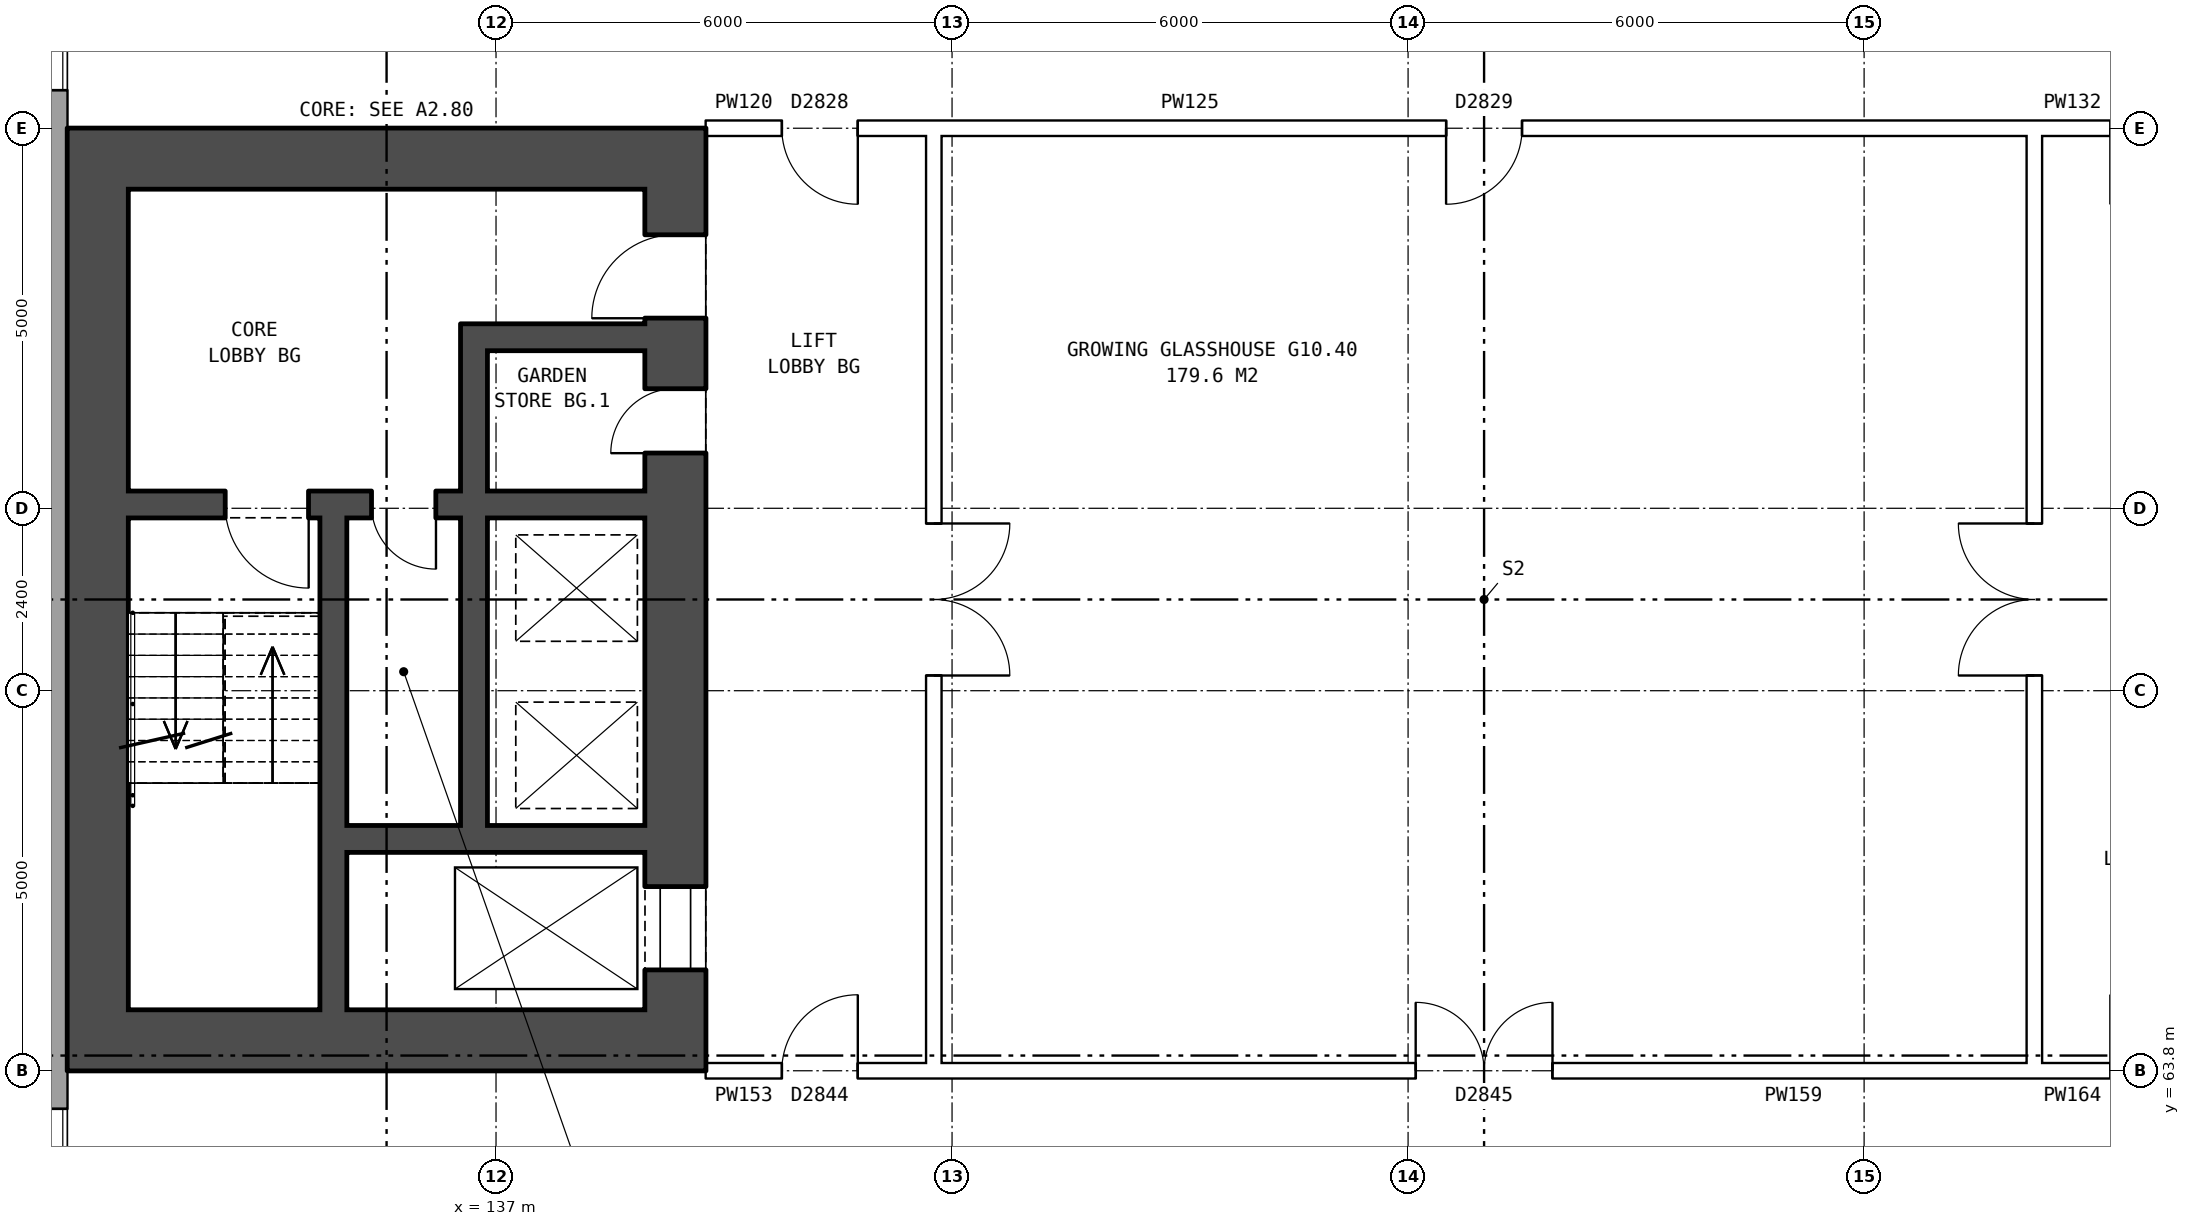
"""IFC4 building model, lengths in metres.
Left out: names, types, materials, properties, quantities, classifications, styles, units other than length and angle.
Written with IfcOpenShell. Run it as: python <this file> out.ifc"""

import sys

from ifc_helpers import new_model, si_unit, direction, frame, frame_2d, origin, place, context, subcontext, project, spatial, rectangle, extrude, element, fill, save


model = new_model("IFC4")
c1 = context("Model", 3, precision=1e-05, world=origin(), true_north=direction((0.0, 1.0)))
c2 = subcontext(c1, "Body", "Model", "MODEL_VIEW")
j1 = project(units=[si_unit("LENGTHUNIT", "METRE"), si_unit("PLANEANGLEUNIT", "RADIAN")], contexts=[c1])
p1 = place(None, origin())
s1 = spatial("IfcSite", under=j1, at=p1, CompositionType="ELEMENT")
p2 = place(p1, origin())
s2 = spatial("IfcBuilding", under=s1, at=p2, CompositionType="ELEMENT")
p3 = place(p2, frame((0.0, 0.0, 38.1)))
s3 = spatial("IfcBuildingStorey", under=s2, at=p3, CompositionType="ELEMENT", Elevation=38.1)
p4 = place(p3, frame((131.18, 82.925, 0.0), z_axis=(0.0, 0.0, 1.0), x_axis=(0.0, -1.0, 0.0)))
e1 = element("IfcWall", 1, at=p4, inside=s3, PredefinedType="STANDARD", context=c2, shape_type="SweptSolid", body=[
    extrude(rectangle(XDim=25.851, YDim=0.36, at=frame_2d((12.925, 0.0))), origin(), (0.0, 0.0, 1.0), 5.6),
])
p5 = place(p4, frame((1.625, 0.0, 0.15)))
e2 = element("IfcOpeningElement", 2, at=p5, cuts=e1, PredefinedType="OPENING", context=c2, shape_type="SweptSolid", body=[
    extrude(rectangle(XDim=1.6, YDim=2.4, at=frame_2d((0.8, 1.2))), frame((0.0, 0.19, 0.0), z_axis=(0.0, -1.0, 0.0), x_axis=(1.0, 0.0, 0.0)), (0.0, 0.0, 1.0), 0.38),
])
p6 = place(p4, frame((4.625, 0.0, 0.15)))
e3 = element("IfcOpeningElement", 3, at=p6, cuts=e1, PredefinedType="OPENING", context=c2, shape_type="SweptSolid", body=[
    extrude(rectangle(XDim=1.6, YDim=2.4, at=frame_2d((0.8, 1.2))), frame((0.0, 0.19, 0.0), z_axis=(0.0, -1.0, 0.0), x_axis=(1.0, 0.0, 0.0)), (0.0, 0.0, 1.0), 0.38),
])
p7 = place(p4, frame((19.625, 0.0, 0.15)))
e4 = element("IfcOpeningElement", 4, at=p7, cuts=e1, PredefinedType="OPENING", context=c2, shape_type="SweptSolid", body=[
    extrude(rectangle(XDim=1.6, YDim=2.4, at=frame_2d((0.8, 1.2))), frame((0.0, 0.19, 0.0), z_axis=(0.0, -1.0, 0.0), x_axis=(1.0, 0.0, 0.0)), (0.0, 0.0, 1.0), 0.38),
])
p8 = place(p4, frame((22.625, 0.0, 0.15)))
e5 = element("IfcOpeningElement", 5, at=p8, cuts=e1, PredefinedType="OPENING", context=c2, shape_type="SweptSolid", body=[
    extrude(rectangle(XDim=1.6, YDim=2.4, at=frame_2d((0.8, 1.2))), frame((0.0, 0.19, 0.0), z_axis=(0.0, -1.0, 0.0), x_axis=(1.0, 0.0, 0.0)), (0.0, 0.0, 1.0), 0.38),
])
p9 = place(p3, frame((139.36, 64.6, 0.0), z_axis=(0.0, 0.0, 1.0), x_axis=(0.0, 1.0, 0.0)))
e6 = element("IfcWall", 6, at=p9, inside=s3, PredefinedType="SHEAR", context=c2, shape_type="SweptSolid", body=[
    extrude(rectangle(XDim=10.8, YDim=0.8, at=frame_2d((5.4, 0.0))), origin(), (0.0, 0.0, 1.0), 5.6),
])
p10 = place(p9, frame((0.525, 0.0, 0.0)))
e7 = element("IfcOpeningElement", 7, at=p10, cuts=e6, PredefinedType="OPENING", context=c2, shape_type="SweptSolid", body=[
    extrude(rectangle(XDim=1.1, YDim=2.1, at=frame_2d((0.55, 1.05))), frame((0.0, 0.41, 0.0), z_axis=(0.0, -1.0, 0.0), x_axis=(1.0, 0.0, 0.0)), (0.0, 0.0, 1.0), 0.82),
])
p11 = place(p9, frame((9.1, 0.0, 0.0)))
e8 = element("IfcOpeningElement", 8, at=p11, cuts=e6, PredefinedType="OPENING", context=c2, shape_type="SweptSolid", body=[
    extrude(rectangle(XDim=1.1, YDim=2.1, at=frame_2d((0.55, 1.05))), frame((0.0, 0.41, 0.0), z_axis=(0.0, -1.0, 0.0), x_axis=(1.0, 0.0, 0.0)), (0.0, 0.0, 1.0), 0.82),
])
p12 = place(p9, frame((7.325, 0.0, 0.0)))
e9 = element("IfcOpeningElement", 9, at=p12, cuts=e6, PredefinedType="OPENING", context=c2, shape_type="SweptSolid", body=[
    extrude(rectangle(XDim=0.85, YDim=2.1, at=frame_2d((0.425, 1.05))), frame((0.0, 0.41, 0.0), z_axis=(0.0, -1.0, 0.0), x_axis=(1.0, 0.0, 0.0)), (0.0, 0.0, 1.0), 0.82),
])
p13 = place(p3, frame((131.76, 64.6, 0.0), z_axis=(0.0, 0.0, 1.0), x_axis=(0.0, 1.0, 0.0)))
e10 = element("IfcWall", 10, at=p13, inside=s3, PredefinedType="SHEAR", context=c2, shape_type="SweptSolid", body=[
    extrude(rectangle(XDim=10.8, YDim=0.8, at=frame_2d((5.4, 0.0))), origin(), (0.0, 0.0, 1.0), 5.6),
])
for number, where, z_axis, x_axis in (
    (11, (139.76, 64.2, 0.0), (0.0, 0.0, 1.0), (-1.0, 0.0, 0.0)),
    (12, (139.76, 75.8, 0.0), (0.0, 0.0, 1.0), (-1.0, 0.0, 0.0)),
):
    element("IfcWall", number, at=place(p3, frame(where, z_axis=z_axis, x_axis=x_axis)), inside=s3, PredefinedType="SHEAR", context=c2, shape_type="SweptSolid", body=[
        extrude(rectangle(XDim=8.4, YDim=0.8, at=frame_2d((4.2, 0.0))), origin(), (0.0, 0.0, 1.0), 5.6),
    ])
p14 = place(p3, frame((138.96, 66.85, 0.0), z_axis=(0.0, 0.0, 1.0), x_axis=(-1.0, 0.0, 0.0)))
e13 = element("IfcWall", 13, at=p14, inside=s3, PredefinedType="SHEAR", context=c2, shape_type="SweptSolid", body=[
    extrude(rectangle(XDim=3.925, YDim=0.35, at=frame_2d((1.962, 0.0))), origin(), (0.0, 0.0, 1.0), 5.6),
])
p15 = place(p3, frame((138.96, 71.25, 0.0), z_axis=(0.0, 0.0, 1.0), x_axis=(-1.0, 0.0, 0.0)))
e14 = element("IfcWall", 14, at=p15, inside=s3, PredefinedType="SHEAR", context=c2, shape_type="SweptSolid", body=[
    extrude(rectangle(XDim=6.8, YDim=0.35, at=frame_2d((3.4, 0.0))), origin(), (0.0, 0.0, 1.0), 5.6),
])
p16 = place(p15, frame((4.425, 0.0, 0.0)))
e15 = element("IfcOpeningElement", 15, at=p16, cuts=e14, PredefinedType="OPENING", context=c2, shape_type="SweptSolid", body=[
    extrude(rectangle(XDim=1.1, YDim=2.1, at=frame_2d((0.55, 1.05))), frame((0.0, 0.185, 0.0), z_axis=(0.0, -1.0, 0.0), x_axis=(1.0, 0.0, 0.0)), (0.0, 0.0, 1.0), 0.37),
])
p17 = place(p15, frame((2.75, 0.0, 0.0)))
e16 = element("IfcOpeningElement", 16, at=p17, cuts=e14, PredefinedType="OPENING", context=c2, shape_type="SweptSolid", body=[
    extrude(rectangle(XDim=0.85, YDim=2.1, at=frame_2d((0.425, 1.05))), frame((0.0, 0.185, 0.0), z_axis=(0.0, -1.0, 0.0), x_axis=(1.0, 0.0, 0.0)), (0.0, 0.0, 1.0), 0.37),
])
p18 = place(p3, frame((138.96, 73.45, 0.0), z_axis=(0.0, 0.0, 1.0), x_axis=(-1.0, 0.0, 0.0)))
e17 = element("IfcWall", 17, at=p18, inside=s3, PredefinedType="SHEAR", context=c2, shape_type="SweptSolid", body=[
    extrude(rectangle(XDim=2.075, YDim=0.35, at=frame_2d((1.038, 0.0))), origin(), (0.0, 0.0, 1.0), 5.6),
])
p19 = place(p3, frame((136.71, 67.025, 0.0), z_axis=(0.0, 0.0, 1.0), x_axis=(0.0, 1.0, 0.0)))
e18 = element("IfcWall", 18, at=p19, inside=s3, PredefinedType="SHEAR", context=c2, shape_type="SweptSolid", body=[
    extrude(rectangle(XDim=4.05, YDim=0.35, at=frame_2d((2.025, 0.0))), origin(), (0.0, 0.0, 1.0), 5.6),
])
p20 = place(p3, frame((136.71, 71.425, 0.0), z_axis=(0.0, 0.0, 1.0), x_axis=(0.0, 1.0, 0.0)))
e19 = element("IfcWall", 19, at=p20, inside=s3, PredefinedType="SHEAR", context=c2, shape_type="SweptSolid", body=[
    extrude(rectangle(XDim=2.2, YDim=0.35, at=frame_2d((1.1, 0.0))), origin(), (0.0, 0.0, 1.0), 5.6),
])
p21 = place(p3, frame((134.86, 64.6, 0.0), z_axis=(0.0, 0.0, 1.0), x_axis=(0.0, 1.0, 0.0)))
e20 = element("IfcWall", 20, at=p21, inside=s3, PredefinedType="SHEAR", context=c2, shape_type="SweptSolid", body=[
    extrude(rectangle(XDim=6.475, YDim=0.35, at=frame_2d((3.237, 0.0))), origin(), (0.0, 0.0, 1.0), 5.6),
])
p22 = place(p3, frame((142.76, 63.9, 0.0), z_axis=(0.0, 0.0, 1.0), x_axis=(0.0, 1.0, 0.0)))
e21 = element("IfcWall", 21, at=p22, inside=s3, PredefinedType="PARTITIONING", context=c2, shape_type="SweptSolid", body=[
    extrude(rectangle(XDim=12.2, YDim=0.2, at=frame_2d((6.1, 0.0))), origin(), (0.0, 0.0, 1.0), 5.6),
])
p23 = place(p22, frame((5.1, 0.0, 0.0)))
e22 = element("IfcOpeningElement", 22, at=p23, cuts=e21, PredefinedType="OPENING", context=c2, shape_type="SweptSolid", body=[
    extrude(rectangle(XDim=2.0, YDim=2.1, at=frame_2d((1.0, 1.05))), frame((0.0, 0.11, 0.0), z_axis=(0.0, -1.0, 0.0), x_axis=(1.0, 0.0, 0.0)), (0.0, 0.0, 1.0), 0.22),
])
p24 = place(p3, frame((157.24, 63.9, 0.0), z_axis=(0.0, 0.0, 1.0), x_axis=(0.0, 1.0, 0.0)))
e23 = element("IfcWall", 23, at=p24, inside=s3, PredefinedType="PARTITIONING", context=c2, shape_type="SweptSolid", body=[
    extrude(rectangle(XDim=12.2, YDim=0.2, at=frame_2d((6.1, 0.0))), origin(), (0.0, 0.0, 1.0), 5.6),
])
p25 = place(p24, frame((5.1, 0.0, 0.0)))
e24 = element("IfcOpeningElement", 24, at=p25, cuts=e23, PredefinedType="OPENING", context=c2, shape_type="SweptSolid", body=[
    extrude(rectangle(XDim=2.0, YDim=2.1, at=frame_2d((1.0, 1.05))), frame((0.0, 0.11, 0.0), z_axis=(0.0, -1.0, 0.0), x_axis=(1.0, 0.0, 0.0)), (0.0, 0.0, 1.0), 0.22),
])
p26 = place(p3, frame((142.76, 63.8, 0.0), z_axis=(0.0, 0.0, 1.0), x_axis=(1.0, 0.0, 0.0)))
e25 = element("IfcWall", 25, at=p26, inside=s3, PredefinedType="PARTITIONING", context=c2, shape_type="SweptSolid", body=[
    extrude(rectangle(XDim=14.48, YDim=0.2, at=frame_2d((7.24, 0.0))), origin(), (0.0, 0.0, 1.0), 5.6),
])
p27 = place(p26, frame((6.34, 0.0, 0.0)))
e26 = element("IfcOpeningElement", 26, at=p27, cuts=e25, PredefinedType="OPENING", context=c2, shape_type="SweptSolid", body=[
    extrude(rectangle(XDim=1.8, YDim=2.1, at=frame_2d((0.9, 1.05))), frame((0.0, 0.11, 0.0), z_axis=(0.0, -1.0, 0.0), x_axis=(1.0, 0.0, 0.0)), (0.0, 0.0, 1.0), 0.22),
])
p28 = place(p3, frame((139.76, 63.8, 0.0), z_axis=(0.0, 0.0, 1.0), x_axis=(1.0, 0.0, 0.0)))
e27 = element("IfcWall", 27, at=p28, inside=s3, PredefinedType="PARTITIONING", context=c2, shape_type="SweptSolid", body=[
    extrude(rectangle(XDim=3.0, YDim=0.2, at=frame_2d((1.5, 0.0))), origin(), (0.0, 0.0, 1.0), 5.6),
])
p29 = place(p28, frame((1.0, 0.0, 0.0)))
e28 = element("IfcOpeningElement", 28, at=p29, cuts=e27, PredefinedType="OPENING", context=c2, shape_type="SweptSolid", body=[
    extrude(rectangle(XDim=1.0, YDim=2.1, at=frame_2d((0.5, 1.05))), frame((0.0, 0.11, 0.0), z_axis=(0.0, -1.0, 0.0), x_axis=(1.0, 0.0, 0.0)), (0.0, 0.0, 1.0), 0.22),
])
p30 = place(p3, frame((157.24, 63.8, 0.0), z_axis=(0.0, 0.0, 1.0), x_axis=(1.0, 0.0, 0.0)))
e29 = element("IfcWall", 29, at=p30, inside=s3, PredefinedType="PARTITIONING", context=c2, shape_type="SweptSolid", body=[
    extrude(rectangle(XDim=3.0, YDim=0.2, at=frame_2d((1.5, 0.0))), origin(), (0.0, 0.0, 1.0), 5.6),
])
p31 = place(p30, frame((1.0, 0.0, 0.0)))
e30 = element("IfcOpeningElement", 30, at=p31, cuts=e29, PredefinedType="OPENING", context=c2, shape_type="SweptSolid", body=[
    extrude(rectangle(XDim=1.0, YDim=2.1, at=frame_2d((0.5, 1.05))), frame((0.0, 0.11, 0.0), z_axis=(0.0, -1.0, 0.0), x_axis=(1.0, 0.0, 0.0)), (0.0, 0.0, 1.0), 0.22),
])
p32 = place(p3, frame((142.76, 76.2, 0.0), z_axis=(0.0, 0.0, 1.0), x_axis=(1.0, 0.0, 0.0)))
e31 = element("IfcWall", 31, at=p32, inside=s3, PredefinedType="PARTITIONING", context=c2, shape_type="SweptSolid", body=[
    extrude(rectangle(XDim=14.48, YDim=0.2, at=frame_2d((7.24, 0.0))), origin(), (0.0, 0.0, 1.0), 5.6),
])
p33 = place(p32, frame((6.74, 0.0, 0.0)))
e32 = element("IfcOpeningElement", 32, at=p33, cuts=e31, PredefinedType="OPENING", context=c2, shape_type="SweptSolid", body=[
    extrude(rectangle(XDim=1.0, YDim=2.1, at=frame_2d((0.5, 1.05))), frame((0.0, 0.11, 0.0), z_axis=(0.0, -1.0, 0.0), x_axis=(1.0, 0.0, 0.0)), (0.0, 0.0, 1.0), 0.22),
])
p34 = place(p3, frame((139.76, 76.2, 0.0), z_axis=(0.0, 0.0, 1.0), x_axis=(1.0, 0.0, 0.0)))
e33 = element("IfcWall", 33, at=p34, inside=s3, PredefinedType="PARTITIONING", context=c2, shape_type="SweptSolid", body=[
    extrude(rectangle(XDim=3.0, YDim=0.2, at=frame_2d((1.5, 0.0))), origin(), (0.0, 0.0, 1.0), 5.6),
])
p35 = place(p34, frame((1.0, 0.0, 0.0)))
e34 = element("IfcOpeningElement", 34, at=p35, cuts=e33, PredefinedType="OPENING", context=c2, shape_type="SweptSolid", body=[
    extrude(rectangle(XDim=1.0, YDim=2.1, at=frame_2d((0.5, 1.05))), frame((0.0, 0.11, 0.0), z_axis=(0.0, -1.0, 0.0), x_axis=(1.0, 0.0, 0.0)), (0.0, 0.0, 1.0), 0.22),
])
p36 = place(p3, frame((157.24, 76.2, 0.0), z_axis=(0.0, 0.0, 1.0), x_axis=(1.0, 0.0, 0.0)))
e35 = element("IfcWall", 35, at=p36, inside=s3, PredefinedType="PARTITIONING", context=c2, shape_type="SweptSolid", body=[
    extrude(rectangle(XDim=3.0, YDim=0.2, at=frame_2d((1.5, 0.0))), origin(), (0.0, 0.0, 1.0), 5.6),
])
p37 = place(p36, frame((1.0, 0.0, 0.0)))
e36 = element("IfcOpeningElement", 36, at=p37, cuts=e35, PredefinedType="OPENING", context=c2, shape_type="SweptSolid", body=[
    extrude(rectangle(XDim=1.0, YDim=2.1, at=frame_2d((0.5, 1.05))), frame((0.0, 0.11, 0.0), z_axis=(0.0, -1.0, 0.0), x_axis=(1.0, 0.0, 0.0)), (0.0, 0.0, 1.0), 0.22),
])
p38 = place(p6, origin())
e37 = element("IfcWindow", 37, at=p38, inside=s3, PartitioningType="SINGLE_PANEL", PredefinedType="WINDOW", context=c2, shape_type="SweptSolid", body=[
    extrude(rectangle(XDim=1.6, YDim=2.4, at=frame_2d((0.8, 1.2))), frame((0.0, 0.15, 0.0), z_axis=(0.0, -1.0, 0.0), x_axis=(1.0, 0.0, 0.0)), (0.0, 0.0, 1.0), 0.06),
])
fill(e3, e37)
p39 = place(p7, origin())
e38 = element("IfcWindow", 38, at=p39, inside=s3, PartitioningType="SINGLE_PANEL", PredefinedType="WINDOW", context=c2, shape_type="SweptSolid", body=[
    extrude(rectangle(XDim=1.6, YDim=2.4, at=frame_2d((0.8, 1.2))), frame((0.0, 0.15, 0.0), z_axis=(0.0, -1.0, 0.0), x_axis=(1.0, 0.0, 0.0)), (0.0, 0.0, 1.0), 0.06),
])
fill(e4, e38)
p40 = place(p10, origin())
e39 = element("IfcDoor", 39, at=p40, inside=s3, OperationType="DOUBLE_DOOR_SLIDING", PredefinedType="DOOR", context=c2, shape_type="SweptSolid", body=[
    extrude(rectangle(XDim=1.1, YDim=2.1, at=frame_2d((0.55, 1.05))), frame((0.0, 0.385, 0.0), z_axis=(0.0, -1.0, 0.0), x_axis=(1.0, 0.0, 0.0)), (0.0, 0.0, 1.0), 0.05),
])
fill(e7, e39)
p41 = place(p11, origin())
e40 = element("IfcDoor", 40, at=p41, inside=s3, OperationType="SINGLE_SWING_LEFT", PredefinedType="DOOR", context=c2, shape_type="SweptSolid", body=[
    extrude(rectangle(XDim=1.1, YDim=2.1, at=frame_2d((0.55, 1.05))), frame((0.0, 0.385, 0.0), z_axis=(0.0, -1.0, 0.0), x_axis=(1.0, 0.0, 0.0)), (0.0, 0.0, 1.0), 0.05),
])
fill(e8, e40)
p42 = place(p16, origin())
e41 = element("IfcDoor", 41, at=p42, inside=s3, OperationType="SINGLE_SWING_LEFT", PredefinedType="DOOR", context=c2, shape_type="SweptSolid", body=[
    extrude(rectangle(XDim=1.1, YDim=2.1, at=frame_2d((0.55, 1.05))), frame((0.0, 0.025, 0.0), z_axis=(0.0, -1.0, 0.0), x_axis=(1.0, 0.0, 0.0)), (0.0, 0.0, 1.0), 0.05),
])
fill(e15, e41)
p43 = place(p12, origin())
e42 = element("IfcDoor", 42, at=p43, inside=s3, OperationType="SINGLE_SWING_LEFT", PredefinedType="DOOR", context=c2, shape_type="SweptSolid", body=[
    extrude(rectangle(XDim=0.85, YDim=2.1, at=frame_2d((0.425, 1.05))), frame((0.0, 0.385, 0.0), z_axis=(0.0, -1.0, 0.0), x_axis=(1.0, 0.0, 0.0)), (0.0, 0.0, 1.0), 0.05),
])
fill(e9, e42)
p44 = place(p17, origin())
e43 = element("IfcDoor", 43, at=p44, inside=s3, OperationType="SINGLE_SWING_LEFT", PredefinedType="DOOR", context=c2, shape_type="SweptSolid", body=[
    extrude(rectangle(XDim=0.85, YDim=2.1, at=frame_2d((0.425, 1.05))), frame((0.0, 0.025, 0.0), z_axis=(0.0, -1.0, 0.0), x_axis=(1.0, 0.0, 0.0)), (0.0, 0.0, 1.0), 0.05),
])
fill(e16, e43)
p45 = place(p23, frame((2.0, 0.0, 0.0), z_axis=(0.0, 0.0, 1.0), x_axis=(-1.0, 0.0, 0.0)))
e44 = element("IfcDoor", 44, at=p45, inside=s3, OperationType="DOUBLE_DOOR_SINGLE_SWING", PredefinedType="DOOR", context=c2, shape_type="SweptSolid", body=[
    extrude(rectangle(XDim=2.0, YDim=2.1, at=frame_2d((1.0, 1.05))), frame((0.0, 0.025, 0.0), z_axis=(0.0, -1.0, 0.0), x_axis=(1.0, 0.0, 0.0)), (0.0, 0.0, 1.0), 0.05),
])
fill(e22, e44)
p46 = place(p25, origin())
e45 = element("IfcDoor", 45, at=p46, inside=s3, OperationType="DOUBLE_DOOR_SINGLE_SWING", PredefinedType="DOOR", context=c2, shape_type="SweptSolid", body=[
    extrude(rectangle(XDim=2.0, YDim=2.1, at=frame_2d((1.0, 1.05))), frame((0.0, 0.025, 0.0), z_axis=(0.0, -1.0, 0.0), x_axis=(1.0, 0.0, 0.0)), (0.0, 0.0, 1.0), 0.05),
])
fill(e24, e45)
p47 = place(p27, origin())
e46 = element("IfcDoor", 46, at=p47, inside=s3, OperationType="DOUBLE_DOOR_SINGLE_SWING", PredefinedType="DOOR", context=c2, shape_type="SweptSolid", body=[
    extrude(rectangle(XDim=1.8, YDim=2.1, at=frame_2d((0.9, 1.05))), frame((0.0, 0.025, 0.0), z_axis=(0.0, -1.0, 0.0), x_axis=(1.0, 0.0, 0.0)), (0.0, 0.0, 1.0), 0.05),
])
fill(e26, e46)
p48 = place(p29, origin())
e47 = element("IfcDoor", 47, at=p48, inside=s3, OperationType="SINGLE_SWING_RIGHT", PredefinedType="DOOR", context=c2, shape_type="SweptSolid", body=[
    extrude(rectangle(XDim=1.0, YDim=2.1, at=frame_2d((0.5, 1.05))), frame((0.0, 0.025, 0.0), z_axis=(0.0, -1.0, 0.0), x_axis=(1.0, 0.0, 0.0)), (0.0, 0.0, 1.0), 0.05),
])
fill(e28, e47)
p49 = place(p33, frame((1.0, 0.0, 0.0), z_axis=(0.0, 0.0, 1.0), x_axis=(-1.0, 0.0, 0.0)))
e48 = element("IfcDoor", 48, at=p49, inside=s3, OperationType="SINGLE_SWING_RIGHT", PredefinedType="DOOR", context=c2, shape_type="SweptSolid", body=[
    extrude(rectangle(XDim=1.0, YDim=2.1, at=frame_2d((0.5, 1.05))), frame((0.0, 0.025, 0.0), z_axis=(0.0, -1.0, 0.0), x_axis=(1.0, 0.0, 0.0)), (0.0, 0.0, 1.0), 0.05),
])
fill(e32, e48)
p50 = place(p35, frame((1.0, 0.0, 0.0), z_axis=(0.0, 0.0, 1.0), x_axis=(-1.0, 0.0, 0.0)))
e49 = element("IfcDoor", 49, at=p50, inside=s3, OperationType="SINGLE_SWING_LEFT", PredefinedType="DOOR", context=c2, shape_type="SweptSolid", body=[
    extrude(rectangle(XDim=1.0, YDim=2.1, at=frame_2d((0.5, 1.05))), frame((0.0, 0.025, 0.0), z_axis=(0.0, -1.0, 0.0), x_axis=(1.0, 0.0, 0.0)), (0.0, 0.0, 1.0), 0.05),
])
fill(e34, e49)
save(model, sys.argv[1])
